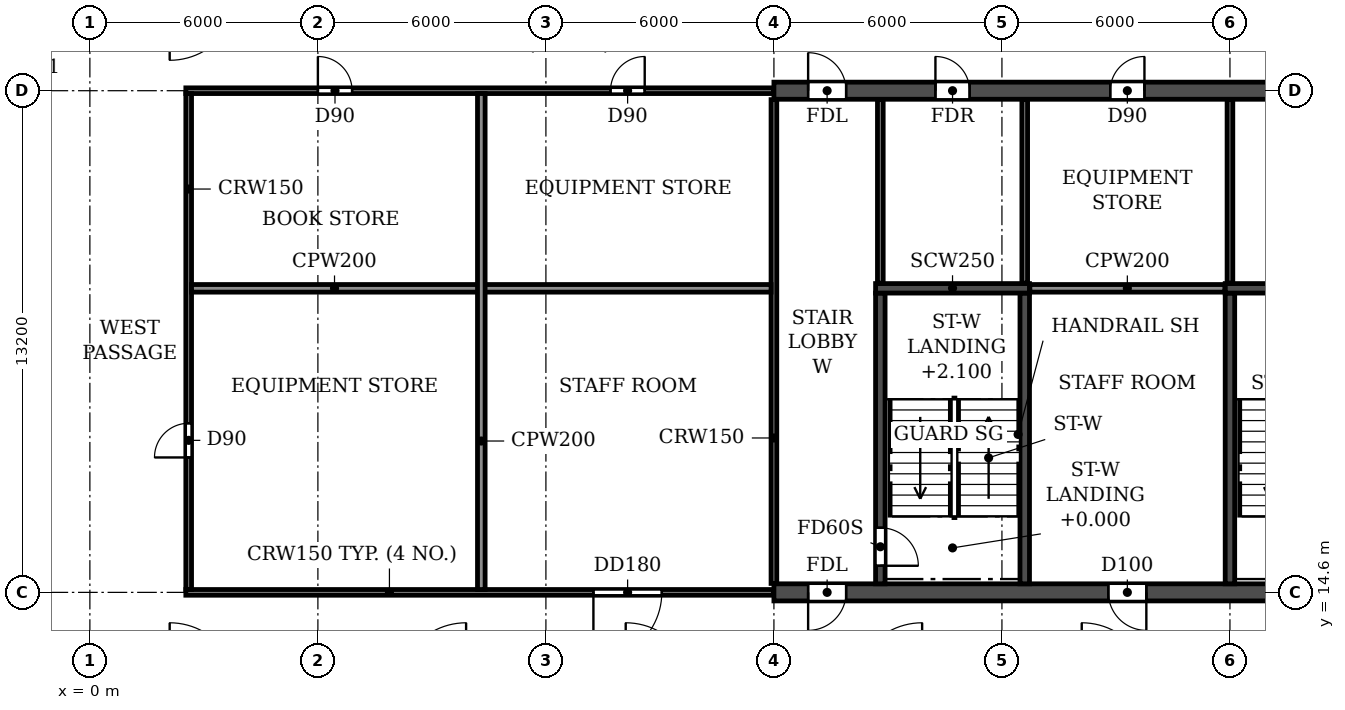
"""IFC4 building model, lengths in metres.
Left out: names, types, materials, properties, quantities, classifications, styles, units other than length and angle.
Written with IfcOpenShell. Run it as: python <this file> out.ifc"""

import sys

from ifc_helpers import new_model, si_unit, direction, frame, frame_2d, origin, place, context, subcontext, project, spatial, rectangle, extrude, element, fill, save


model = new_model("IFC4")
c1 = context("Model", 3, precision=1e-05, world=origin(), true_north=direction((0.0, 1.0)))
c2 = subcontext(c1, "Body", "Model", "MODEL_VIEW")
j1 = project(units=[si_unit("LENGTHUNIT", "METRE"), si_unit("PLANEANGLEUNIT", "RADIAN")], contexts=[c1])
p1 = place(None, origin())
s1 = spatial("IfcSite", under=j1, at=p1, CompositionType="ELEMENT")
p2 = place(p1, origin())
s2 = spatial("IfcBuilding", under=s1, at=p2, CompositionType="ELEMENT")
p3 = place(p2, frame((0.0, 0.0, 15.0)))
s3 = spatial("IfcBuildingStorey", under=s2, at=p3, CompositionType="ELEMENT", Elevation=15.0)
p4 = place(p3, frame((18.0, 14.6, 0.0), z_axis=(0.0, 0.0, 1.0), x_axis=(1.0, 0.0, 0.0)))
e1 = element("IfcWall", 1, at=p4, inside=s3, PredefinedType="SOLIDWALL", context=c2, shape_type="SweptSolid", body=[
    extrude(rectangle(XDim=66.0, YDim=0.45, at=frame_2d((33.0, 0.0))), origin(), (0.0, 0.0, 1.0), 3.92),
])
p5 = place(p4, frame((0.9, 0.0, 0.0)))
e2 = element("IfcOpeningElement", 2, at=p5, cuts=e1, PredefinedType="OPENING", context=c2, shape_type="SweptSolid", body=[
    extrude(rectangle(XDim=1.0, YDim=2.1, at=frame_2d((0.5, 1.05))), frame((0.0, 0.235, 0.0), z_axis=(0.0, -1.0, 0.0), x_axis=(1.0, 0.0, 0.0)), (0.0, 0.0, 1.0), 0.47),
])
p6 = place(p4, frame((8.8, 0.0, 0.0)))
e3 = element("IfcOpeningElement", 3, at=p6, cuts=e1, PredefinedType="OPENING", context=c2, shape_type="SweptSolid", body=[
    extrude(rectangle(XDim=1.0, YDim=2.1, at=frame_2d((0.5, 1.05))), frame((0.0, 0.235, 0.0), z_axis=(0.0, -1.0, 0.0), x_axis=(1.0, 0.0, 0.0)), (0.0, 0.0, 1.0), 0.47),
])
p7 = place(p4, frame((13.4, 0.0, 0.0)))
e4 = element("IfcOpeningElement", 4, at=p7, cuts=e1, PredefinedType="OPENING", context=c2, shape_type="SweptSolid", body=[
    extrude(rectangle(XDim=1.0, YDim=2.1, at=frame_2d((0.5, 1.05))), frame((0.0, 0.235, 0.0), z_axis=(0.0, -1.0, 0.0), x_axis=(1.0, 0.0, 0.0)), (0.0, 0.0, 1.0), 0.47),
])
p8 = place(p4, frame((26.0, 0.0, 0.0)))
e5 = element("IfcOpeningElement", 5, at=p8, cuts=e1, PredefinedType="OPENING", context=c2, shape_type="SweptSolid", body=[
    extrude(rectangle(XDim=1.0, YDim=2.1, at=frame_2d((0.5, 1.05))), frame((0.0, 0.235, 0.0), z_axis=(0.0, -1.0, 0.0), x_axis=(1.0, 0.0, 0.0)), (0.0, 0.0, 1.0), 0.47),
])
p9 = place(p4, frame((29.9, 0.0, 0.0)))
e6 = element("IfcOpeningElement", 6, at=p9, cuts=e1, PredefinedType="OPENING", context=c2, shape_type="SweptSolid", body=[
    extrude(rectangle(XDim=1.0, YDim=2.1, at=frame_2d((0.5, 1.05))), frame((0.0, 0.235, 0.0), z_axis=(0.0, -1.0, 0.0), x_axis=(1.0, 0.0, 0.0)), (0.0, 0.0, 1.0), 0.47),
])
p10 = place(p4, frame((32.5, 0.0, 0.0)))
e7 = element("IfcOpeningElement", 7, at=p10, cuts=e1, PredefinedType="OPENING", context=c2, shape_type="SweptSolid", body=[
    extrude(rectangle(XDim=1.0, YDim=2.1, at=frame_2d((0.5, 1.05))), frame((0.0, 0.235, 0.0), z_axis=(0.0, -1.0, 0.0), x_axis=(1.0, 0.0, 0.0)), (0.0, 0.0, 1.0), 0.47),
])
p11 = place(p4, frame((35.1, 0.0, 0.0)))
e8 = element("IfcOpeningElement", 8, at=p11, cuts=e1, PredefinedType="OPENING", context=c2, shape_type="SweptSolid", body=[
    extrude(rectangle(XDim=1.0, YDim=2.1, at=frame_2d((0.5, 1.05))), frame((0.0, 0.235, 0.0), z_axis=(0.0, -1.0, 0.0), x_axis=(1.0, 0.0, 0.0)), (0.0, 0.0, 1.0), 0.47),
])
p12 = place(p4, frame((39.0, 0.0, 0.0)))
e9 = element("IfcOpeningElement", 9, at=p12, cuts=e1, PredefinedType="OPENING", context=c2, shape_type="SweptSolid", body=[
    extrude(rectangle(XDim=1.0, YDim=2.1, at=frame_2d((0.5, 1.05))), frame((0.0, 0.235, 0.0), z_axis=(0.0, -1.0, 0.0), x_axis=(1.0, 0.0, 0.0)), (0.0, 0.0, 1.0), 0.47),
])
p13 = place(p4, frame((51.6, 0.0, 0.0)))
e10 = element("IfcOpeningElement", 10, at=p13, cuts=e1, PredefinedType="OPENING", context=c2, shape_type="SweptSolid", body=[
    extrude(rectangle(XDim=1.0, YDim=2.1, at=frame_2d((0.5, 1.05))), frame((0.0, 0.235, 0.0), z_axis=(0.0, -1.0, 0.0), x_axis=(1.0, 0.0, 0.0)), (0.0, 0.0, 1.0), 0.47),
])
p14 = place(p4, frame((56.25, 0.0, 0.0)))
e11 = element("IfcOpeningElement", 11, at=p14, cuts=e1, PredefinedType="OPENING", context=c2, shape_type="SweptSolid", body=[
    extrude(rectangle(XDim=0.9, YDim=2.1, at=frame_2d((0.45, 1.05))), frame((0.0, 0.235, 0.0), z_axis=(0.0, -1.0, 0.0), x_axis=(1.0, 0.0, 0.0)), (0.0, 0.0, 1.0), 0.47),
])
p15 = place(p4, frame((64.1, 0.0, 0.0)))
e12 = element("IfcOpeningElement", 12, at=p15, cuts=e1, PredefinedType="OPENING", context=c2, shape_type="SweptSolid", body=[
    extrude(rectangle(XDim=1.0, YDim=2.1, at=frame_2d((0.5, 1.05))), frame((0.0, 0.235, 0.0), z_axis=(0.0, -1.0, 0.0), x_axis=(1.0, 0.0, 0.0)), (0.0, 0.0, 1.0), 0.47),
])
p16 = place(p3, frame((18.0, 27.8, 0.0), z_axis=(0.0, 0.0, 1.0), x_axis=(1.0, 0.0, 0.0)))
e13 = element("IfcWall", 13, at=p16, inside=s3, PredefinedType="SOLIDWALL", context=c2, shape_type="SweptSolid", body=[
    extrude(rectangle(XDim=66.0, YDim=0.45, at=frame_2d((33.0, 0.0))), origin(), (0.0, 0.0, 1.0), 3.92),
])
p17 = place(p16, frame((0.9, 0.0, 0.0)))
e14 = element("IfcOpeningElement", 14, at=p17, cuts=e13, PredefinedType="OPENING", context=c2, shape_type="SweptSolid", body=[
    extrude(rectangle(XDim=1.0, YDim=2.1, at=frame_2d((0.5, 1.05))), frame((0.0, 0.235, 0.0), z_axis=(0.0, -1.0, 0.0), x_axis=(1.0, 0.0, 0.0)), (0.0, 0.0, 1.0), 0.47),
])
p18 = place(p16, frame((4.25, 0.0, 0.0)))
e15 = element("IfcOpeningElement", 15, at=p18, cuts=e13, PredefinedType="OPENING", context=c2, shape_type="SweptSolid", body=[
    extrude(rectangle(XDim=0.9, YDim=2.1, at=frame_2d((0.45, 1.05))), frame((0.0, 0.235, 0.0), z_axis=(0.0, -1.0, 0.0), x_axis=(1.0, 0.0, 0.0)), (0.0, 0.0, 1.0), 0.47),
])
p19 = place(p16, frame((8.85, 0.0, 0.0)))
e16 = element("IfcOpeningElement", 16, at=p19, cuts=e13, PredefinedType="OPENING", context=c2, shape_type="SweptSolid", body=[
    extrude(rectangle(XDim=0.9, YDim=2.1, at=frame_2d((0.45, 1.05))), frame((0.0, 0.235, 0.0), z_axis=(0.0, -1.0, 0.0), x_axis=(1.0, 0.0, 0.0)), (0.0, 0.0, 1.0), 0.47),
])
p20 = place(p16, frame((13.45, 0.0, 0.0)))
e17 = element("IfcOpeningElement", 17, at=p20, cuts=e13, PredefinedType="OPENING", context=c2, shape_type="SweptSolid", body=[
    extrude(rectangle(XDim=0.9, YDim=2.1, at=frame_2d((0.45, 1.05))), frame((0.0, 0.235, 0.0), z_axis=(0.0, -1.0, 0.0), x_axis=(1.0, 0.0, 0.0)), (0.0, 0.0, 1.0), 0.47),
])
p21 = place(p16, frame((16.6, 0.0, 0.0)))
e18 = element("IfcOpeningElement", 18, at=p21, cuts=e13, PredefinedType="OPENING", context=c2, shape_type="SweptSolid", body=[
    extrude(rectangle(XDim=1.0, YDim=2.1, at=frame_2d((0.5, 1.05))), frame((0.0, 0.235, 0.0), z_axis=(0.0, -1.0, 0.0), x_axis=(1.0, 0.0, 0.0)), (0.0, 0.0, 1.0), 0.47),
])
p22 = place(p16, frame((21.8, 0.0, 0.0)))
e19 = element("IfcOpeningElement", 19, at=p22, cuts=e13, PredefinedType="OPENING", context=c2, shape_type="SweptSolid", body=[
    extrude(rectangle(XDim=1.0, YDim=2.1, at=frame_2d((0.5, 1.05))), frame((0.0, 0.235, 0.0), z_axis=(0.0, -1.0, 0.0), x_axis=(1.0, 0.0, 0.0)), (0.0, 0.0, 1.0), 0.47),
])
p23 = place(p16, frame((29.6, 0.0, 0.0)))
e20 = element("IfcOpeningElement", 20, at=p23, cuts=e13, PredefinedType="OPENING", context=c2, shape_type="SweptSolid", body=[
    extrude(rectangle(XDim=1.0, YDim=2.1, at=frame_2d((0.5, 1.05))), frame((0.0, 0.235, 0.0), z_axis=(0.0, -1.0, 0.0), x_axis=(1.0, 0.0, 0.0)), (0.0, 0.0, 1.0), 0.47),
])
p24 = place(p16, frame((32.5, 0.0, 0.0)))
e21 = element("IfcOpeningElement", 21, at=p24, cuts=e13, PredefinedType="OPENING", context=c2, shape_type="SweptSolid", body=[
    extrude(rectangle(XDim=1.0, YDim=2.1, at=frame_2d((0.5, 1.05))), frame((0.0, 0.235, 0.0), z_axis=(0.0, -1.0, 0.0), x_axis=(1.0, 0.0, 0.0)), (0.0, 0.0, 1.0), 0.47),
])
p25 = place(p16, frame((35.4, 0.0, 0.0)))
e22 = element("IfcOpeningElement", 22, at=p25, cuts=e13, PredefinedType="OPENING", context=c2, shape_type="SweptSolid", body=[
    extrude(rectangle(XDim=1.0, YDim=2.1, at=frame_2d((0.5, 1.05))), frame((0.0, 0.235, 0.0), z_axis=(0.0, -1.0, 0.0), x_axis=(1.0, 0.0, 0.0)), (0.0, 0.0, 1.0), 0.47),
])
p26 = place(p16, frame((39.3, 0.0, 0.0)))
e23 = element("IfcOpeningElement", 23, at=p26, cuts=e13, PredefinedType="OPENING", context=c2, shape_type="SweptSolid", body=[
    extrude(rectangle(XDim=1.0, YDim=2.1, at=frame_2d((0.5, 1.05))), frame((0.0, 0.235, 0.0), z_axis=(0.0, -1.0, 0.0), x_axis=(1.0, 0.0, 0.0)), (0.0, 0.0, 1.0), 0.47),
])
p27 = place(p16, frame((43.2, 0.0, 0.0)))
e24 = element("IfcOpeningElement", 24, at=p27, cuts=e13, PredefinedType="OPENING", context=c2, shape_type="SweptSolid", body=[
    extrude(rectangle(XDim=1.0, YDim=2.1, at=frame_2d((0.5, 1.05))), frame((0.0, 0.235, 0.0), z_axis=(0.0, -1.0, 0.0), x_axis=(1.0, 0.0, 0.0)), (0.0, 0.0, 1.0), 0.47),
])
p28 = place(p16, frame((45.8, 0.0, 0.0)))
e25 = element("IfcOpeningElement", 25, at=p28, cuts=e13, PredefinedType="OPENING", context=c2, shape_type="SweptSolid", body=[
    extrude(rectangle(XDim=1.0, YDim=2.1, at=frame_2d((0.5, 1.05))), frame((0.0, 0.235, 0.0), z_axis=(0.0, -1.0, 0.0), x_axis=(1.0, 0.0, 0.0)), (0.0, 0.0, 1.0), 0.47),
])
p29 = place(p16, frame((48.4, 0.0, 0.0)))
e26 = element("IfcOpeningElement", 26, at=p29, cuts=e13, PredefinedType="OPENING", context=c2, shape_type="SweptSolid", body=[
    extrude(rectangle(XDim=1.0, YDim=2.1, at=frame_2d((0.5, 1.05))), frame((0.0, 0.235, 0.0), z_axis=(0.0, -1.0, 0.0), x_axis=(1.0, 0.0, 0.0)), (0.0, 0.0, 1.0), 0.47),
])
p30 = place(p16, frame((51.65, 0.0, 0.0)))
e27 = element("IfcOpeningElement", 27, at=p30, cuts=e13, PredefinedType="OPENING", context=c2, shape_type="SweptSolid", body=[
    extrude(rectangle(XDim=0.9, YDim=2.1, at=frame_2d((0.45, 1.05))), frame((0.0, 0.235, 0.0), z_axis=(0.0, -1.0, 0.0), x_axis=(1.0, 0.0, 0.0)), (0.0, 0.0, 1.0), 0.47),
])
p31 = place(p16, frame((56.2, 0.0, 0.0)))
e28 = element("IfcOpeningElement", 28, at=p31, cuts=e13, PredefinedType="OPENING", context=c2, shape_type="SweptSolid", body=[
    extrude(rectangle(XDim=1.0, YDim=2.1, at=frame_2d((0.5, 1.05))), frame((0.0, 0.235, 0.0), z_axis=(0.0, -1.0, 0.0), x_axis=(1.0, 0.0, 0.0)), (0.0, 0.0, 1.0), 0.47),
])
p32 = place(p16, frame((60.85, 0.0, 0.0)))
e29 = element("IfcOpeningElement", 29, at=p32, cuts=e13, PredefinedType="OPENING", context=c2, shape_type="SweptSolid", body=[
    extrude(rectangle(XDim=0.9, YDim=2.1, at=frame_2d((0.45, 1.05))), frame((0.0, 0.235, 0.0), z_axis=(0.0, -1.0, 0.0), x_axis=(1.0, 0.0, 0.0)), (0.0, 0.0, 1.0), 0.47),
])
p33 = place(p16, frame((64.1, 0.0, 0.0)))
e30 = element("IfcOpeningElement", 30, at=p33, cuts=e13, PredefinedType="OPENING", context=c2, shape_type="SweptSolid", body=[
    extrude(rectangle(XDim=1.0, YDim=2.1, at=frame_2d((0.5, 1.05))), frame((0.0, 0.235, 0.0), z_axis=(0.0, -1.0, 0.0), x_axis=(1.0, 0.0, 0.0)), (0.0, 0.0, 1.0), 0.47),
])
p34 = place(p3, frame((30.0, 14.825, 0.0), z_axis=(0.0, 0.0, 1.0), x_axis=(0.0, 1.0, 0.0)))
e31 = element("IfcWall", 31, at=p34, inside=s3, PredefinedType="SOLIDWALL", context=c2, shape_type="SweptSolid", body=[
    extrude(rectangle(XDim=7.65, YDim=0.25, at=frame_2d((3.825, 0.0))), origin(), (0.0, 0.0, 1.0), 3.92),
])
p35 = place(p3, frame((29.875, 22.6, 0.0), z_axis=(0.0, 0.0, 1.0), x_axis=(1.0, 0.0, 0.0)))
e32 = element("IfcWall", 32, at=p35, inside=s3, PredefinedType="SOLIDWALL", context=c2, shape_type="SweptSolid", body=[
    extrude(rectangle(XDim=4.05, YDim=0.25, at=frame_2d((2.025, 0.0))), origin(), (0.0, 0.0, 1.0), 3.92),
])
p36 = place(p3, frame((20.8, 14.825, 0.0), z_axis=(0.0, 0.0, 1.0), x_axis=(0.0, 1.0, 0.0)))
e33 = element("IfcWall", 33, at=p36, inside=s3, PredefinedType="SOLIDWALL", context=c2, shape_type="SweptSolid", body=[
    extrude(rectangle(XDim=7.65, YDim=0.25, at=frame_2d((3.825, 0.0))), origin(), (0.0, 0.0, 1.0), 3.92),
])
p37 = place(p36, frame((0.475, 0.0, 0.0)))
e34 = element("IfcOpeningElement", 34, at=p37, cuts=e33, PredefinedType="OPENING", context=c2, shape_type="SweptSolid", body=[
    extrude(rectangle(XDim=1.0, YDim=2.1, at=frame_2d((0.5, 1.05))), frame((0.0, 0.135, 0.0), z_axis=(0.0, -1.0, 0.0), x_axis=(1.0, 0.0, 0.0)), (0.0, 0.0, 1.0), 0.27),
])
p38 = place(p3, frame((24.6, 14.825, 0.0), z_axis=(0.0, 0.0, 1.0), x_axis=(0.0, 1.0, 0.0)))
e35 = element("IfcWall", 35, at=p38, inside=s3, PredefinedType="SOLIDWALL", context=c2, shape_type="SweptSolid", body=[
    extrude(rectangle(XDim=7.65, YDim=0.25, at=frame_2d((3.825, 0.0))), origin(), (0.0, 0.0, 1.0), 3.92),
])
p39 = place(p3, frame((20.675, 22.6, 0.0), z_axis=(0.0, 0.0, 1.0), x_axis=(1.0, 0.0, 0.0)))
e36 = element("IfcWall", 36, at=p39, inside=s3, PredefinedType="SOLIDWALL", context=c2, shape_type="SweptSolid", body=[
    extrude(rectangle(XDim=4.05, YDim=0.25, at=frame_2d((2.025, 0.0))), origin(), (0.0, 0.0, 1.0), 3.92),
])
p40 = place(p3, frame((2.525, 14.6, 0.0), z_axis=(0.0, 0.0, 1.0), x_axis=(1.0, 0.0, 0.0)))
e37 = element("IfcWall", 37, at=p40, inside=s3, PredefinedType="PARTITIONING", context=c2, shape_type="SweptSolid", body=[
    extrude(rectangle(XDim=15.465, YDim=0.15, at=frame_2d((7.732, 0.0))), origin(), (0.0, 0.0, 1.0), 3.92),
])
p41 = place(p40, frame((10.725, 0.0, 0.0)))
e38 = element("IfcOpeningElement", 38, at=p41, cuts=e37, PredefinedType="OPENING", context=c2, shape_type="SweptSolid", body=[
    extrude(rectangle(XDim=1.8, YDim=2.1, at=frame_2d((0.9, 1.05))), frame((0.0, 0.085, 0.0), z_axis=(0.0, -1.0, 0.0), x_axis=(1.0, 0.0, 0.0)), (0.0, 0.0, 1.0), 0.17),
])
p42 = place(p3, frame((2.525, 27.8, 0.0), z_axis=(0.0, 0.0, 1.0), x_axis=(1.0, 0.0, 0.0)))
e39 = element("IfcWall", 39, at=p42, inside=s3, PredefinedType="PARTITIONING", context=c2, shape_type="SweptSolid", body=[
    extrude(rectangle(XDim=15.465, YDim=0.15, at=frame_2d((7.732, 0.0))), origin(), (0.0, 0.0, 1.0), 3.92),
])
p43 = place(p42, frame((3.475, 0.0, 0.0)))
e40 = element("IfcOpeningElement", 40, at=p43, cuts=e39, PredefinedType="OPENING", context=c2, shape_type="SweptSolid", body=[
    extrude(rectangle(XDim=0.9, YDim=2.1, at=frame_2d((0.45, 1.05))), frame((0.0, 0.085, 0.0), z_axis=(0.0, -1.0, 0.0), x_axis=(1.0, 0.0, 0.0)), (0.0, 0.0, 1.0), 0.17),
])
p44 = place(p42, frame((11.175, 0.0, 0.0)))
e41 = element("IfcOpeningElement", 41, at=p44, cuts=e39, PredefinedType="OPENING", context=c2, shape_type="SweptSolid", body=[
    extrude(rectangle(XDim=0.9, YDim=2.1, at=frame_2d((0.45, 1.05))), frame((0.0, 0.085, 0.0), z_axis=(0.0, -1.0, 0.0), x_axis=(1.0, 0.0, 0.0)), (0.0, 0.0, 1.0), 0.17),
])
p45 = place(p3, frame((2.6, 14.675, 0.0), z_axis=(0.0, 0.0, 1.0), x_axis=(0.0, 1.0, 0.0)))
e42 = element("IfcWall", 42, at=p45, inside=s3, PredefinedType="PARTITIONING", context=c2, shape_type="SweptSolid", body=[
    extrude(rectangle(XDim=13.05, YDim=0.15, at=frame_2d((6.525, 0.0))), origin(), (0.0, 0.0, 1.0), 3.92),
])
p46 = place(p45, frame((3.475, 0.0, 0.0)))
e43 = element("IfcOpeningElement", 43, at=p46, cuts=e42, PredefinedType="OPENING", context=c2, shape_type="SweptSolid", body=[
    extrude(rectangle(XDim=0.9, YDim=2.1, at=frame_2d((0.45, 1.05))), frame((0.0, 0.085, 0.0), z_axis=(0.0, -1.0, 0.0), x_axis=(1.0, 0.0, 0.0)), (0.0, 0.0, 1.0), 0.17),
])
p47 = place(p3, frame((18.0, 14.835, 0.0), z_axis=(0.0, 0.0, 1.0), x_axis=(0.0, 1.0, 0.0)))
e44 = element("IfcWall", 44, at=p47, inside=s3, PredefinedType="PARTITIONING", context=c2, shape_type="SweptSolid", body=[
    extrude(rectangle(XDim=12.73, YDim=0.15, at=frame_2d((6.365, 0.0))), origin(), (0.0, 0.0, 1.0), 3.92),
])
p48 = place(p3, frame((2.675, 22.6, 0.0), z_axis=(0.0, 0.0, 1.0), x_axis=(1.0, 0.0, 0.0)))
e45 = element("IfcWall", 45, at=p48, inside=s3, PredefinedType="PARTITIONING", context=c2, shape_type="SweptSolid", body=[
    extrude(rectangle(XDim=15.25, YDim=0.2, at=frame_2d((7.625, 0.0))), origin(), (0.0, 0.0, 1.0), 3.92),
])
p49 = place(p3, frame((24.735, 22.6, 0.0), z_axis=(0.0, 0.0, 1.0), x_axis=(1.0, 0.0, 0.0)))
e46 = element("IfcWall", 46, at=p49, inside=s3, PredefinedType="PARTITIONING", context=c2, shape_type="SweptSolid", body=[
    extrude(rectangle(XDim=5.13, YDim=0.2, at=frame_2d((2.565, 0.0))), origin(), (0.0, 0.0, 1.0), 3.92),
])
p50 = place(p3, frame((10.3, 14.675, 0.0), z_axis=(0.0, 0.0, 1.0), x_axis=(0.0, 1.0, 0.0)))
e47 = element("IfcWall", 47, at=p50, inside=s3, PredefinedType="PARTITIONING", context=c2, shape_type="SweptSolid", body=[
    extrude(rectangle(XDim=13.05, YDim=0.2, at=frame_2d((6.525, 0.0))), origin(), (0.0, 0.0, 1.0), 3.92),
])
for number, where, z_axis, x_axis in (
    (48, (20.8, 22.735, 0.0), (0.0, 0.0, 1.0), (0.0, 1.0, 0.0)),
    (49, (24.6, 22.735, 0.0), (0.0, 0.0, 1.0), (0.0, 1.0, 0.0)),
    (50, (30.0, 22.735, 0.0), (0.0, 0.0, 1.0), (0.0, 1.0, 0.0)),
):
    element("IfcWall", number, at=place(p3, frame(where, z_axis=z_axis, x_axis=x_axis)), inside=s3, PredefinedType="PARTITIONING", context=c2, shape_type="SweptSolid", body=[
        extrude(rectangle(XDim=4.83, YDim=0.15, at=frame_2d((2.415, 0.0))), origin(), (0.0, 0.0, 1.0), 3.92),
    ])
p51 = place(p43, origin())
e51 = element("IfcDoor", 51, at=p51, inside=s3, OperationType="SINGLE_SWING_LEFT", PredefinedType="DOOR", context=c2, shape_type="SweptSolid", body=[
    extrude(rectangle(XDim=0.9, YDim=2.1, at=frame_2d((0.45, 1.05))), frame((0.0, 0.025, 0.0), z_axis=(0.0, -1.0, 0.0), x_axis=(1.0, 0.0, 0.0)), (0.0, 0.0, 1.0), 0.05),
])
fill(e40, e51)
p52 = place(p44, origin())
e52 = element("IfcDoor", 52, at=p52, inside=s3, OperationType="SINGLE_SWING_RIGHT", PredefinedType="DOOR", context=c2, shape_type="SweptSolid", body=[
    extrude(rectangle(XDim=0.9, YDim=2.1, at=frame_2d((0.45, 1.05))), frame((0.0, 0.025, 0.0), z_axis=(0.0, -1.0, 0.0), x_axis=(1.0, 0.0, 0.0)), (0.0, 0.0, 1.0), 0.05),
])
fill(e41, e52)
p53 = place(p17, origin())
e53 = element("IfcDoor", 53, at=p53, inside=s3, OperationType="SINGLE_SWING_LEFT", PredefinedType="DOOR", context=c2, shape_type="SweptSolid", body=[
    extrude(rectangle(XDim=1.0, YDim=2.1, at=frame_2d((0.5, 1.05))), frame((0.0, 0.025, 0.0), z_axis=(0.0, -1.0, 0.0), x_axis=(1.0, 0.0, 0.0)), (0.0, 0.0, 1.0), 0.05),
])
fill(e14, e53)
p54 = place(p18, origin())
e54 = element("IfcDoor", 54, at=p54, inside=s3, OperationType="SINGLE_SWING_LEFT", PredefinedType="DOOR", context=c2, shape_type="SweptSolid", body=[
    extrude(rectangle(XDim=0.9, YDim=2.1, at=frame_2d((0.45, 1.05))), frame((0.0, 0.025, 0.0), z_axis=(0.0, -1.0, 0.0), x_axis=(1.0, 0.0, 0.0)), (0.0, 0.0, 1.0), 0.05),
])
fill(e15, e54)
p55 = place(p19, origin())
e55 = element("IfcDoor", 55, at=p55, inside=s3, OperationType="SINGLE_SWING_RIGHT", PredefinedType="DOOR", context=c2, shape_type="SweptSolid", body=[
    extrude(rectangle(XDim=0.9, YDim=2.1, at=frame_2d((0.45, 1.05))), frame((0.0, 0.025, 0.0), z_axis=(0.0, -1.0, 0.0), x_axis=(1.0, 0.0, 0.0)), (0.0, 0.0, 1.0), 0.05),
])
fill(e16, e55)
p56 = place(p41, frame((1.8, 0.0, 0.0), z_axis=(0.0, 0.0, 1.0), x_axis=(-1.0, 0.0, 0.0)))
e56 = element("IfcDoor", 56, at=p56, inside=s3, OperationType="DOUBLE_DOOR_SINGLE_SWING", PredefinedType="DOOR", context=c2, shape_type="SweptSolid", body=[
    extrude(rectangle(XDim=1.8, YDim=2.1, at=frame_2d((0.9, 1.05))), frame((0.0, 0.025, 0.0), z_axis=(0.0, -1.0, 0.0), x_axis=(1.0, 0.0, 0.0)), (0.0, 0.0, 1.0), 0.05),
])
fill(e38, e56)
p57 = place(p5, frame((1.0, 0.0, 0.0), z_axis=(0.0, 0.0, 1.0), x_axis=(-1.0, 0.0, 0.0)))
e57 = element("IfcDoor", 57, at=p57, inside=s3, OperationType="SINGLE_SWING_RIGHT", PredefinedType="DOOR", context=c2, shape_type="SweptSolid", body=[
    extrude(rectangle(XDim=1.0, YDim=2.1, at=frame_2d((0.5, 1.05))), frame((0.0, 0.025, 0.0), z_axis=(0.0, -1.0, 0.0), x_axis=(1.0, 0.0, 0.0)), (0.0, 0.0, 1.0), 0.05),
])
fill(e2, e57)
p58 = place(p6, frame((1.0, 0.0, 0.0), z_axis=(0.0, 0.0, 1.0), x_axis=(-1.0, 0.0, 0.0)))
e58 = element("IfcDoor", 58, at=p58, inside=s3, OperationType="SINGLE_SWING_LEFT", PredefinedType="DOOR", context=c2, shape_type="SweptSolid", body=[
    extrude(rectangle(XDim=1.0, YDim=2.1, at=frame_2d((0.5, 1.05))), frame((0.0, 0.025, 0.0), z_axis=(0.0, -1.0, 0.0), x_axis=(1.0, 0.0, 0.0)), (0.0, 0.0, 1.0), 0.05),
])
fill(e3, e58)
p59 = place(p46, origin())
e59 = element("IfcDoor", 59, at=p59, inside=s3, OperationType="SINGLE_SWING_LEFT", PredefinedType="DOOR", context=c2, shape_type="SweptSolid", body=[
    extrude(rectangle(XDim=0.9, YDim=2.1, at=frame_2d((0.45, 1.05))), frame((0.0, 0.025, 0.0), z_axis=(0.0, -1.0, 0.0), x_axis=(1.0, 0.0, 0.0)), (0.0, 0.0, 1.0), 0.05),
])
fill(e43, e59)
p60 = place(p37, frame((1.0, 0.0, 0.0), z_axis=(0.0, 0.0, 1.0), x_axis=(-1.0, 0.0, 0.0)))
e60 = element("IfcDoor", 60, at=p60, inside=s3, OperationType="SINGLE_SWING_RIGHT", PredefinedType="DOOR", context=c2, shape_type="SweptSolid", body=[
    extrude(rectangle(XDim=1.0, YDim=2.1, at=frame_2d((0.5, 1.05))), frame((0.0, 0.025, 0.0), z_axis=(0.0, -1.0, 0.0), x_axis=(1.0, 0.0, 0.0)), (0.0, 0.0, 1.0), 0.05),
])
fill(e34, e60)
save(model, sys.argv[1])
